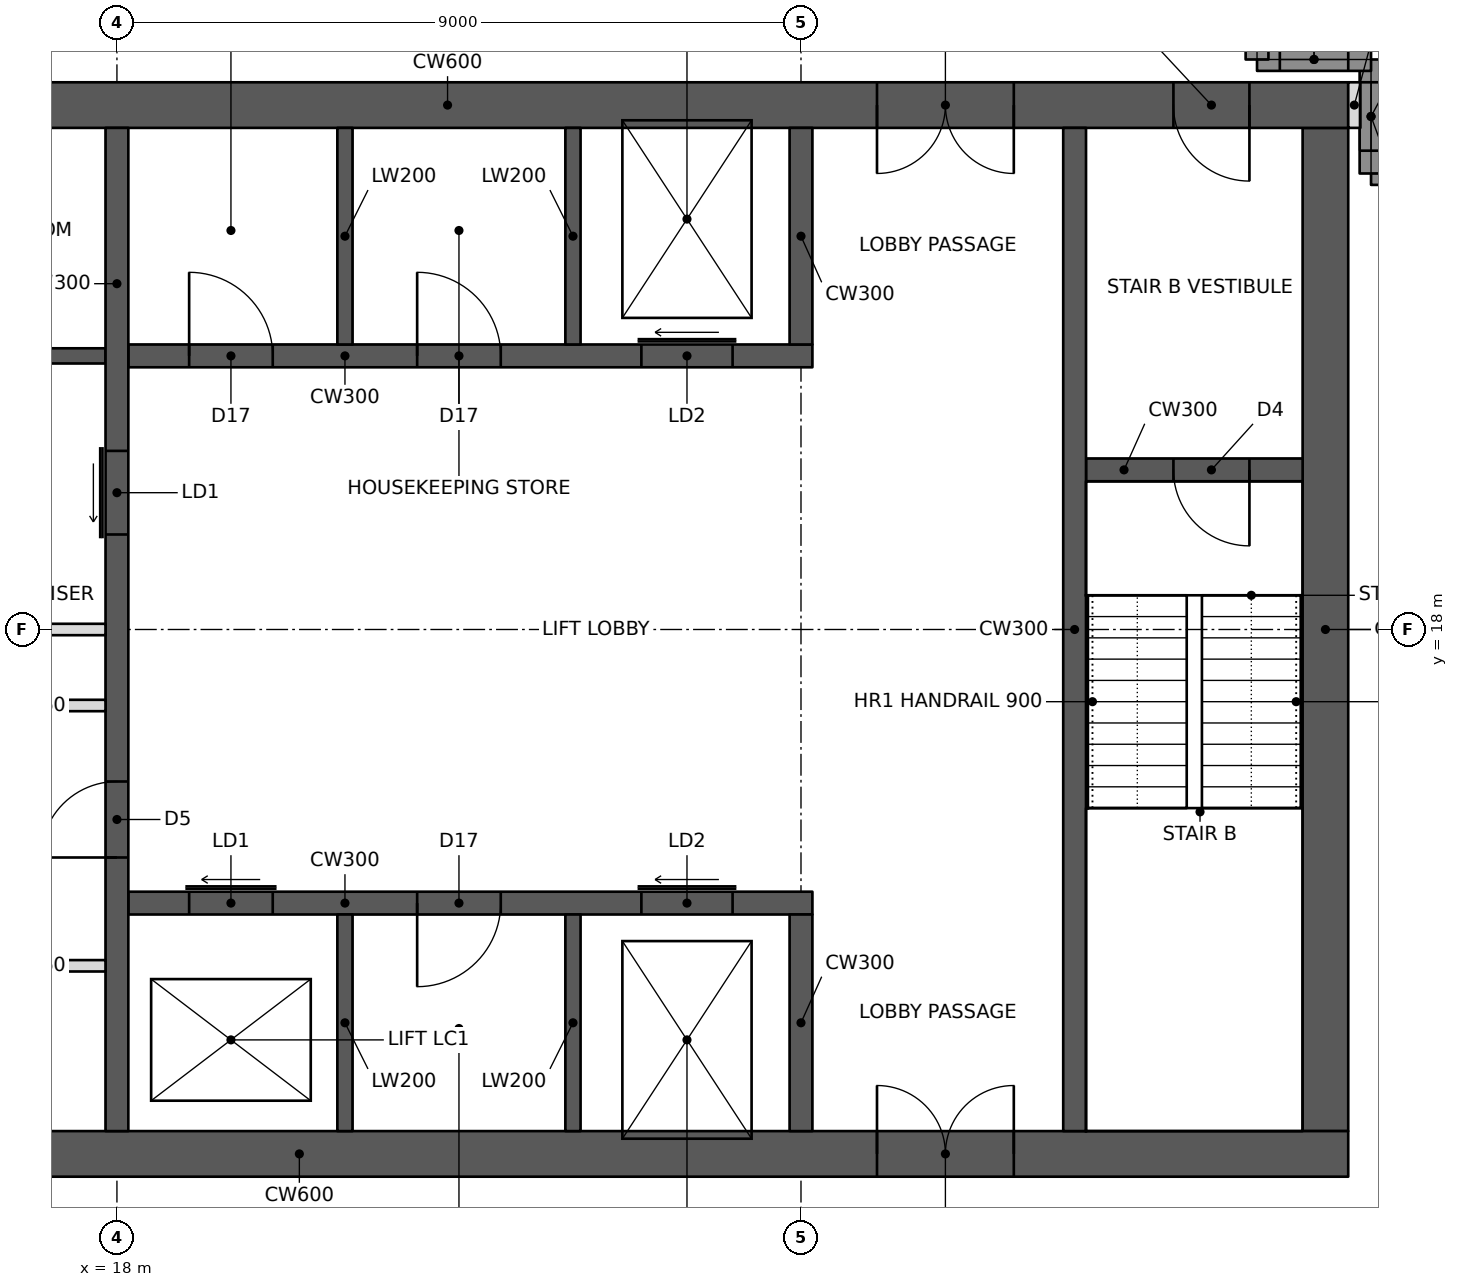
"""IFC4 building model, lengths in metres.
Left out: names, types, materials, properties, quantities, classifications, styles, units other than length and angle.
Written with IfcOpenShell. Run it as: python <this file> out.ifc"""

import sys

from ifc_helpers import new_model, si_unit, direction, frame, frame_2d, origin, place, context, subcontext, project, spatial, rectangle, extrude, element, fill, save


model = new_model("IFC4")
c1 = context("Model", 3, precision=1e-05, world=origin(), true_north=direction((0.0, 1.0)))
c2 = subcontext(c1, "Body", "Model", "MODEL_VIEW")
j1 = project(units=[si_unit("LENGTHUNIT", "METRE"), si_unit("PLANEANGLEUNIT", "RADIAN")], contexts=[c1])
p1 = place(None, origin())
s1 = spatial("IfcSite", under=j1, at=p1, CompositionType="ELEMENT")
p2 = place(p1, origin())
s2 = spatial("IfcBuilding", under=s1, at=p2, CompositionType="ELEMENT")
p3 = place(p2, frame((0.0, 0.0, 262.6)))
s3 = spatial("IfcBuildingStorey", under=s2, at=p3, CompositionType="ELEMENT", Elevation=262.6)
p4 = place(p3, frame((10.8, 11.1, 0.0), z_axis=(0.0, 0.0, 1.0), x_axis=(1.0, 0.0, 0.0)))
e1 = element("IfcWall", 1, at=p4, inside=s3, PredefinedType="SHEAR", context=c2, shape_type="SweptSolid", body=[
    extrude(rectangle(XDim=23.4, YDim=0.6, at=frame_2d((11.7, 0.0))), origin(), (0.0, 0.0, 1.0), 3.6),
])
p5 = place(p4, frame((1.0, 0.0, 0.0)))
e2 = element("IfcOpeningElement", 2, at=p5, cuts=e1, PredefinedType="OPENING", context=c2, shape_type="SweptSolid", body=[
    extrude(rectangle(XDim=1.0, YDim=2.1, at=frame_2d((0.5, 1.05))), frame((0.0, 0.31, 0.0), z_axis=(0.0, -1.0, 0.0), x_axis=(1.0, 0.0, 0.0)), (0.0, 0.0, 1.0), 0.62),
])
p6 = place(p4, frame((17.2, 0.0, 0.0)))
e3 = element("IfcOpeningElement", 3, at=p6, cuts=e1, PredefinedType="OPENING", context=c2, shape_type="SweptSolid", body=[
    extrude(rectangle(XDim=1.8, YDim=2.1, at=frame_2d((0.9, 1.05))), frame((0.0, 0.31, 0.0), z_axis=(0.0, -1.0, 0.0), x_axis=(1.0, 0.0, 0.0)), (0.0, 0.0, 1.0), 0.62),
])
p7 = place(p3, frame((10.8, 24.9, 0.0), z_axis=(0.0, 0.0, 1.0), x_axis=(1.0, 0.0, 0.0)))
e4 = element("IfcWall", 4, at=p7, inside=s3, PredefinedType="SHEAR", context=c2, shape_type="SweptSolid", body=[
    extrude(rectangle(XDim=23.4, YDim=0.6, at=frame_2d((11.7, 0.0))), origin(), (0.0, 0.0, 1.0), 3.6),
])
p8 = place(p7, frame((17.2, 0.0, 0.0)))
e5 = element("IfcOpeningElement", 5, at=p8, cuts=e4, PredefinedType="OPENING", context=c2, shape_type="SweptSolid", body=[
    extrude(rectangle(XDim=1.8, YDim=2.1, at=frame_2d((0.9, 1.05))), frame((0.0, 0.31, 0.0), z_axis=(0.0, -1.0, 0.0), x_axis=(1.0, 0.0, 0.0)), (0.0, 0.0, 1.0), 0.62),
])
p9 = place(p7, frame((21.1, 0.0, 0.0)))
e6 = element("IfcOpeningElement", 6, at=p9, cuts=e4, PredefinedType="OPENING", context=c2, shape_type="SweptSolid", body=[
    extrude(rectangle(XDim=1.0, YDim=2.1, at=frame_2d((0.5, 1.05))), frame((0.0, 0.31, 0.0), z_axis=(0.0, -1.0, 0.0), x_axis=(1.0, 0.0, 0.0)), (0.0, 0.0, 1.0), 0.62),
])
p10 = place(p7, frame((4.9, 0.0, 0.0)))
e7 = element("IfcOpeningElement", 7, at=p10, cuts=e4, PredefinedType="OPENING", context=c2, shape_type="SweptSolid", body=[
    extrude(rectangle(XDim=1.0, YDim=2.1, at=frame_2d((0.5, 1.05))), frame((0.0, 0.31, 0.0), z_axis=(0.0, -1.0, 0.0), x_axis=(1.0, 0.0, 0.0)), (0.0, 0.0, 1.0), 0.62),
])
p11 = place(p3, frame((33.9, 11.4, 0.0), z_axis=(0.0, 0.0, 1.0), x_axis=(0.0, 1.0, 0.0)))
e8 = element("IfcWall", 8, at=p11, inside=s3, PredefinedType="SHEAR", context=c2, shape_type="SweptSolid", body=[
    extrude(rectangle(XDim=13.2, YDim=0.6, at=frame_2d((6.6, 0.0))), origin(), (0.0, 0.0, 1.0), 3.6),
])
p12 = place(p3, frame((18.0, 11.4, 0.0), z_axis=(0.0, 0.0, 1.0), x_axis=(0.0, 1.0, 0.0)))
e9 = element("IfcWall", 9, at=p12, inside=s3, PredefinedType="SHEAR", context=c2, shape_type="SweptSolid", body=[
    extrude(rectangle(XDim=13.2, YDim=0.3, at=frame_2d((6.6, 0.0))), origin(), (0.0, 0.0, 1.0), 3.6),
])
p13 = place(p12, frame((3.6, 0.0, 0.0)))
e10 = element("IfcOpeningElement", 10, at=p13, cuts=e9, PredefinedType="OPENING", context=c2, shape_type="SweptSolid", body=[
    extrude(rectangle(XDim=1.0, YDim=2.1, at=frame_2d((0.5, 1.05))), frame((0.0, 0.16, 0.0), z_axis=(0.0, -1.0, 0.0), x_axis=(1.0, 0.0, 0.0)), (0.0, 0.0, 1.0), 0.32),
])
p14 = place(p12, frame((7.85, 0.0, 0.0)))
e11 = element("IfcOpeningElement", 11, at=p14, cuts=e9, PredefinedType="OPENING", context=c2, shape_type="SweptSolid", body=[
    extrude(rectangle(XDim=1.1, YDim=2.1, at=frame_2d((0.55, 1.05))), frame((0.0, 0.16, 0.0), z_axis=(0.0, -1.0, 0.0), x_axis=(1.0, 0.0, 0.0)), (0.0, 0.0, 1.0), 0.32),
])
p15 = place(p3, frame((14.55, 18.0, 0.0), z_axis=(0.0, 0.0, 1.0), x_axis=(1.0, 0.0, 0.0)))
e12 = element("IfcWall", 12, at=p15, inside=s3, PredefinedType="PARTITIONING", context=c2, shape_type="SweptSolid", body=[
    extrude(rectangle(XDim=3.3, YDim=0.15, at=frame_2d((1.65, 0.0))), origin(), (0.0, 0.0, 1.0), 3.4),
])
p16 = place(p3, frame((18.15, 14.4, 0.0), z_axis=(0.0, 0.0, 1.0), x_axis=(1.0, 0.0, 0.0)))
e13 = element("IfcWall", 13, at=p16, inside=s3, PredefinedType="SHEAR", context=c2, shape_type="SweptSolid", body=[
    extrude(rectangle(XDim=9.0, YDim=0.3, at=frame_2d((4.5, 0.0))), origin(), (0.0, 0.0, 1.0), 3.6),
])
p17 = place(p16, frame((0.8, 0.0, 0.0)))
e14 = element("IfcOpeningElement", 14, at=p17, cuts=e13, PredefinedType="OPENING", context=c2, shape_type="SweptSolid", body=[
    extrude(rectangle(XDim=1.1, YDim=2.1, at=frame_2d((0.55, 1.05))), frame((0.0, 0.16, 0.0), z_axis=(0.0, -1.0, 0.0), x_axis=(1.0, 0.0, 0.0)), (0.0, 0.0, 1.0), 0.32),
])
p18 = place(p16, frame((6.75, 0.0, 0.0)))
e15 = element("IfcOpeningElement", 15, at=p18, cuts=e13, PredefinedType="OPENING", context=c2, shape_type="SweptSolid", body=[
    extrude(rectangle(XDim=1.2, YDim=2.1, at=frame_2d((0.6, 1.05))), frame((0.0, 0.16, 0.0), z_axis=(0.0, -1.0, 0.0), x_axis=(1.0, 0.0, 0.0)), (0.0, 0.0, 1.0), 0.32),
])
p19 = place(p16, frame((3.8, 0.0, 0.0)))
e16 = element("IfcOpeningElement", 16, at=p19, cuts=e13, PredefinedType="OPENING", context=c2, shape_type="SweptSolid", body=[
    extrude(rectangle(XDim=1.1, YDim=2.1, at=frame_2d((0.55, 1.05))), frame((0.0, 0.16, 0.0), z_axis=(0.0, -1.0, 0.0), x_axis=(1.0, 0.0, 0.0)), (0.0, 0.0, 1.0), 0.32),
])
p20 = place(p3, frame((27.0, 11.4, 0.0), z_axis=(0.0, 0.0, 1.0), x_axis=(0.0, 1.0, 0.0)))
e17 = element("IfcWall", 17, at=p20, inside=s3, PredefinedType="SHEAR", context=c2, shape_type="SweptSolid", body=[
    extrude(rectangle(XDim=2.85, YDim=0.3, at=frame_2d((1.425, 0.0))), origin(), (0.0, 0.0, 1.0), 3.6),
])
for number, where, z_axis, x_axis in (
    (18, (21.0, 11.4, 0.0), (0.0, 0.0, 1.0), (0.0, 1.0, 0.0)),
    (19, (24.0, 11.4, 0.0), (0.0, 0.0, 1.0), (0.0, 1.0, 0.0)),
):
    element("IfcWall", number, at=place(p3, frame(where, z_axis=z_axis, x_axis=x_axis)), inside=s3, PredefinedType="SHEAR", context=c2, shape_type="SweptSolid", body=[
        extrude(rectangle(XDim=2.85, YDim=0.2, at=frame_2d((1.425, 0.0))), origin(), (0.0, 0.0, 1.0), 3.6),
    ])
p21 = place(p3, frame((18.15, 21.6, 0.0), z_axis=(0.0, 0.0, 1.0), x_axis=(1.0, 0.0, 0.0)))
e20 = element("IfcWall", 20, at=p21, inside=s3, PredefinedType="SHEAR", context=c2, shape_type="SweptSolid", body=[
    extrude(rectangle(XDim=9.0, YDim=0.3, at=frame_2d((4.5, 0.0))), origin(), (0.0, 0.0, 1.0), 3.6),
])
p22 = place(p21, frame((6.75, 0.0, 0.0)))
e21 = element("IfcOpeningElement", 21, at=p22, cuts=e20, PredefinedType="OPENING", context=c2, shape_type="SweptSolid", body=[
    extrude(rectangle(XDim=1.2, YDim=2.1, at=frame_2d((0.6, 1.05))), frame((0.0, 0.16, 0.0), z_axis=(0.0, -1.0, 0.0), x_axis=(1.0, 0.0, 0.0)), (0.0, 0.0, 1.0), 0.32),
])
p23 = place(p21, frame((0.8, 0.0, 0.0)))
e22 = element("IfcOpeningElement", 22, at=p23, cuts=e20, PredefinedType="OPENING", context=c2, shape_type="SweptSolid", body=[
    extrude(rectangle(XDim=1.1, YDim=2.1, at=frame_2d((0.55, 1.05))), frame((0.0, 0.16, 0.0), z_axis=(0.0, -1.0, 0.0), x_axis=(1.0, 0.0, 0.0)), (0.0, 0.0, 1.0), 0.32),
])
p24 = place(p21, frame((3.8, 0.0, 0.0)))
e23 = element("IfcOpeningElement", 23, at=p24, cuts=e20, PredefinedType="OPENING", context=c2, shape_type="SweptSolid", body=[
    extrude(rectangle(XDim=1.1, YDim=2.1, at=frame_2d((0.55, 1.05))), frame((0.0, 0.16, 0.0), z_axis=(0.0, -1.0, 0.0), x_axis=(1.0, 0.0, 0.0)), (0.0, 0.0, 1.0), 0.32),
])
p25 = place(p3, frame((27.0, 21.75, 0.0), z_axis=(0.0, 0.0, 1.0), x_axis=(0.0, 1.0, 0.0)))
e24 = element("IfcWall", 24, at=p25, inside=s3, PredefinedType="SHEAR", context=c2, shape_type="SweptSolid", body=[
    extrude(rectangle(XDim=2.85, YDim=0.3, at=frame_2d((1.425, 0.0))), origin(), (0.0, 0.0, 1.0), 3.6),
])
for number, where, z_axis, x_axis in (
    (25, (21.0, 21.75, 0.0), (0.0, 0.0, 1.0), (0.0, 1.0, 0.0)),
    (26, (24.0, 21.75, 0.0), (0.0, 0.0, 1.0), (0.0, 1.0, 0.0)),
):
    element("IfcWall", number, at=place(p3, frame(where, z_axis=z_axis, x_axis=x_axis)), inside=s3, PredefinedType="SHEAR", context=c2, shape_type="SweptSolid", body=[
        extrude(rectangle(XDim=2.85, YDim=0.2, at=frame_2d((1.425, 0.0))), origin(), (0.0, 0.0, 1.0), 3.6),
    ])
p26 = place(p3, frame((30.6, 11.4, 0.0), z_axis=(0.0, 0.0, 1.0), x_axis=(0.0, 1.0, 0.0)))
e27 = element("IfcWall", 27, at=p26, inside=s3, PredefinedType="SHEAR", context=c2, shape_type="SweptSolid", body=[
    extrude(rectangle(XDim=13.2, YDim=0.3, at=frame_2d((6.6, 0.0))), origin(), (0.0, 0.0, 1.0), 3.6),
])
p27 = place(p3, frame((30.75, 20.1, 0.0), z_axis=(0.0, 0.0, 1.0), x_axis=(1.0, 0.0, 0.0)))
e28 = element("IfcWall", 28, at=p27, inside=s3, PredefinedType="SHEAR", context=c2, shape_type="SweptSolid", body=[
    extrude(rectangle(XDim=2.85, YDim=0.3, at=frame_2d((1.425, 0.0))), origin(), (0.0, 0.0, 1.0), 3.6),
])
p28 = place(p27, frame((1.15, 0.0, 0.0)))
e29 = element("IfcOpeningElement", 29, at=p28, cuts=e28, PredefinedType="OPENING", context=c2, shape_type="SweptSolid", body=[
    extrude(rectangle(XDim=1.0, YDim=2.1, at=frame_2d((0.5, 1.05))), frame((0.0, 0.16, 0.0), z_axis=(0.0, -1.0, 0.0), x_axis=(1.0, 0.0, 0.0)), (0.0, 0.0, 1.0), 0.32),
])
p29 = place(p3, frame((14.55, 21.6, 0.0), z_axis=(0.0, 0.0, 1.0), x_axis=(1.0, 0.0, 0.0)))
e30 = element("IfcWall", 30, at=p29, inside=s3, PredefinedType="SHEAR", context=c2, shape_type="SweptSolid", body=[
    extrude(rectangle(XDim=3.3, YDim=0.2, at=frame_2d((1.65, 0.0))), origin(), (0.0, 0.0, 1.0), 3.6),
])
p30 = place(p3, frame((36.0, 24.0, 0.0), z_axis=(0.0, 0.0, 1.0), x_axis=(-1.0, 0.0, 0.0)))
e31 = element("IfcWall", 31, at=p30, inside=s3, PredefinedType="SOLIDWALL", context=c2, shape_type="SweptSolid", body=[
    extrude(rectangle(XDim=1.5, YDim=0.3, at=frame_2d((0.75, 0.0))), origin(), (0.0, 0.0, 1.0), 2.62),
])
p31 = place(p3, frame((34.5, 24.0, 0.0), z_axis=(0.0, 0.0, 1.0), x_axis=(0.0, 1.0, 0.0)))
e32 = element("IfcWall", 32, at=p31, inside=s3, PredefinedType="SOLIDWALL", context=c2, shape_type="SweptSolid", body=[
    extrude(rectangle(XDim=1.5, YDim=0.3, at=frame_2d((0.75, 0.0))), origin(), (0.0, 0.0, 1.0), 3.4),
])
p32 = place(p31, frame((0.3, 0.0, 0.6)))
e33 = element("IfcOpeningElement", 33, at=p32, cuts=e32, PredefinedType="OPENING", context=c2, shape_type="SweptSolid", body=[
    extrude(rectangle(XDim=0.9, YDim=2.2, at=frame_2d((0.45, 1.1))), frame((0.0, 0.16, 0.0), z_axis=(0.0, -1.0, 0.0), x_axis=(1.0, 0.0, 0.0)), (0.0, 0.0, 1.0), 0.32),
])
p33 = place(p3, frame((34.5, 25.5, 0.0), z_axis=(0.0, 0.0, 1.0), x_axis=(-1.0, 0.0, 0.0)))
e34 = element("IfcWall", 34, at=p33, inside=s3, PredefinedType="SOLIDWALL", context=c2, shape_type="SweptSolid", body=[
    extrude(rectangle(XDim=1.5, YDim=0.3, at=frame_2d((0.75, 0.0))), origin(), (0.0, 0.0, 1.0), 3.4),
])
p34 = place(p33, frame((0.3, 0.0, 0.6)))
e35 = element("IfcOpeningElement", 35, at=p34, cuts=e34, PredefinedType="OPENING", context=c2, shape_type="SweptSolid", body=[
    extrude(rectangle(XDim=0.9, YDim=2.2, at=frame_2d((0.45, 1.1))), frame((0.0, 0.16, 0.0), z_axis=(0.0, -1.0, 0.0), x_axis=(1.0, 0.0, 0.0)), (0.0, 0.0, 1.0), 0.32),
])
p35 = place(p3, frame((33.0, 25.5, 0.0), z_axis=(0.0, 0.0, 1.0), x_axis=(0.0, 1.0, 0.0)))
e36 = element("IfcWall", 36, at=p35, inside=s3, PredefinedType="SOLIDWALL", context=c2, shape_type="SweptSolid", body=[
    extrude(rectangle(XDim=1.5, YDim=0.3, at=frame_2d((0.75, 0.0))), origin(), (0.0, 0.0, 1.0), 2.62),
])
p36 = place(p3, frame((34.2, 24.9, 0.0), z_axis=(0.0, 0.0, 1.0), x_axis=(1.0, 0.0, 0.0)))
e37 = element("IfcWall", 37, at=p36, inside=s3, PredefinedType="PARTITIONING", context=c2, shape_type="SweptSolid", body=[
    extrude(rectangle(XDim=0.16, YDim=0.6, at=frame_2d((0.08, 0.0))), origin(), (0.0, 0.0, 1.0), 3.4),
])
p37 = place(p3, frame((14.55, 17.0, 0.0), z_axis=(0.0, 0.0, 1.0), x_axis=(1.0, 0.0, 0.0)))
e38 = element("IfcWall", 38, at=p37, inside=s3, PredefinedType="PARTITIONING", context=c2, shape_type="SweptSolid", body=[
    extrude(rectangle(XDim=3.3, YDim=0.15, at=frame_2d((1.65, 0.0))), origin(), (0.0, 0.0, 1.0), 3.4),
])
p38 = place(p37, frame((0.3, 0.0, 0.0)))
e39 = element("IfcOpeningElement", 39, at=p38, cuts=e38, PredefinedType="OPENING", context=c2, shape_type="SweptSolid", body=[
    extrude(rectangle(XDim=1.0, YDim=2.1, at=frame_2d((0.5, 1.05))), frame((0.0, 0.085, 0.0), z_axis=(0.0, -1.0, 0.0), x_axis=(1.0, 0.0, 0.0)), (0.0, 0.0, 1.0), 0.17),
])
p39 = place(p3, frame((14.55, 13.575, 0.0), z_axis=(0.0, 0.0, 1.0), x_axis=(1.0, 0.0, 0.0)))
e40 = element("IfcWall", 40, at=p39, inside=s3, PredefinedType="PARTITIONING", context=c2, shape_type="SweptSolid", body=[
    extrude(rectangle(XDim=3.3, YDim=0.15, at=frame_2d((1.65, 0.0))), origin(), (0.0, 0.0, 1.0), 3.4),
])
p40 = place(p39, frame((0.3, 0.0, 0.0)))
e41 = element("IfcOpeningElement", 41, at=p40, cuts=e40, PredefinedType="OPENING", context=c2, shape_type="SweptSolid", body=[
    extrude(rectangle(XDim=1.0, YDim=2.1, at=frame_2d((0.5, 1.05))), frame((0.0, 0.085, 0.0), z_axis=(0.0, -1.0, 0.0), x_axis=(1.0, 0.0, 0.0)), (0.0, 0.0, 1.0), 0.17),
])
p41 = place(p32, origin())
e42 = element("IfcWindow", 42, at=p41, inside=s3, PartitioningType="SINGLE_PANEL", PredefinedType="WINDOW", context=c2, shape_type="SweptSolid", body=[
    extrude(rectangle(XDim=0.9, YDim=2.2, at=frame_2d((0.45, 1.1))), frame((0.0, 0.03, 0.0), z_axis=(0.0, -1.0, 0.0), x_axis=(1.0, 0.0, 0.0)), (0.0, 0.0, 1.0), 0.06),
])
fill(e33, e42)
p42 = place(p34, origin())
e43 = element("IfcWindow", 43, at=p42, inside=s3, PartitioningType="SINGLE_PANEL", PredefinedType="WINDOW", context=c2, shape_type="SweptSolid", body=[
    extrude(rectangle(XDim=0.9, YDim=2.2, at=frame_2d((0.45, 1.1))), frame((0.0, 0.03, 0.0), z_axis=(0.0, -1.0, 0.0), x_axis=(1.0, 0.0, 0.0)), (0.0, 0.0, 1.0), 0.06),
])
fill(e35, e43)
p43 = place(p6, origin())
e44 = element("IfcDoor", 44, at=p43, inside=s3, OperationType="DOUBLE_DOOR_SINGLE_SWING", PredefinedType="DOOR", context=c2, shape_type="SweptSolid", body=[
    extrude(rectangle(XDim=1.8, YDim=2.1, at=frame_2d((0.9, 1.05))), frame((0.0, 0.025, 0.0), z_axis=(0.0, -1.0, 0.0), x_axis=(1.0, 0.0, 0.0)), (0.0, 0.0, 1.0), 0.05),
])
fill(e3, e44)
p44 = place(p8, frame((1.8, 0.0, 0.0), z_axis=(0.0, 0.0, 1.0), x_axis=(-1.0, 0.0, 0.0)))
e45 = element("IfcDoor", 45, at=p44, inside=s3, OperationType="DOUBLE_DOOR_SINGLE_SWING", PredefinedType="DOOR", context=c2, shape_type="SweptSolid", body=[
    extrude(rectangle(XDim=1.8, YDim=2.1, at=frame_2d((0.9, 1.05))), frame((0.0, 0.025, 0.0), z_axis=(0.0, -1.0, 0.0), x_axis=(1.0, 0.0, 0.0)), (0.0, 0.0, 1.0), 0.05),
])
fill(e5, e45)
p45 = place(p9, frame((1.0, 0.0, 0.0), z_axis=(0.0, 0.0, 1.0), x_axis=(-1.0, 0.0, 0.0)))
e46 = element("IfcDoor", 46, at=p45, inside=s3, OperationType="SINGLE_SWING_LEFT", PredefinedType="DOOR", context=c2, shape_type="SweptSolid", body=[
    extrude(rectangle(XDim=1.0, YDim=2.1, at=frame_2d((0.5, 1.05))), frame((0.0, 0.025, 0.0), z_axis=(0.0, -1.0, 0.0), x_axis=(1.0, 0.0, 0.0)), (0.0, 0.0, 1.0), 0.05),
])
fill(e6, e46)
p46 = place(p28, frame((1.0, 0.0, 0.0), z_axis=(0.0, 0.0, 1.0), x_axis=(-1.0, 0.0, 0.0)))
e47 = element("IfcDoor", 47, at=p46, inside=s3, OperationType="SINGLE_SWING_LEFT", PredefinedType="DOOR", context=c2, shape_type="SweptSolid", body=[
    extrude(rectangle(XDim=1.0, YDim=2.1, at=frame_2d((0.5, 1.05))), frame((0.0, 0.025, 0.0), z_axis=(0.0, -1.0, 0.0), x_axis=(1.0, 0.0, 0.0)), (0.0, 0.0, 1.0), 0.05),
])
fill(e29, e47)
p47 = place(p13, origin())
e48 = element("IfcDoor", 48, at=p47, inside=s3, OperationType="SINGLE_SWING_LEFT", PredefinedType="DOOR", context=c2, shape_type="SweptSolid", body=[
    extrude(rectangle(XDim=1.0, YDim=2.1, at=frame_2d((0.5, 1.05))), frame((0.0, 0.025, 0.0), z_axis=(0.0, -1.0, 0.0), x_axis=(1.0, 0.0, 0.0)), (0.0, 0.0, 1.0), 0.05),
])
fill(e10, e48)
p48 = place(p17, origin())
e49 = element("IfcDoor", 49, at=p48, inside=s3, OperationType="SLIDING_TO_LEFT", PredefinedType="DOOR", context=c2, shape_type="SweptSolid", body=[
    extrude(rectangle(XDim=1.1, YDim=2.1, at=frame_2d((0.55, 1.05))), frame((0.0, 0.025, 0.0), z_axis=(0.0, -1.0, 0.0), x_axis=(1.0, 0.0, 0.0)), (0.0, 0.0, 1.0), 0.05),
])
fill(e14, e49)
p49 = place(p14, origin())
e50 = element("IfcDoor", 50, at=p49, inside=s3, OperationType="SLIDING_TO_LEFT", PredefinedType="DOOR", context=c2, shape_type="SweptSolid", body=[
    extrude(rectangle(XDim=1.1, YDim=2.1, at=frame_2d((0.55, 1.05))), frame((0.0, 0.025, 0.0), z_axis=(0.0, -1.0, 0.0), x_axis=(1.0, 0.0, 0.0)), (0.0, 0.0, 1.0), 0.05),
])
fill(e11, e50)
p50 = place(p18, origin())
e51 = element("IfcDoor", 51, at=p50, inside=s3, OperationType="SLIDING_TO_LEFT", PredefinedType="DOOR", context=c2, shape_type="SweptSolid", body=[
    extrude(rectangle(XDim=1.2, YDim=2.1, at=frame_2d((0.6, 1.05))), frame((0.0, 0.025, 0.0), z_axis=(0.0, -1.0, 0.0), x_axis=(1.0, 0.0, 0.0)), (0.0, 0.0, 1.0), 0.05),
])
fill(e15, e51)
p51 = place(p22, origin())
e52 = element("IfcDoor", 52, at=p51, inside=s3, OperationType="SLIDING_TO_LEFT", PredefinedType="DOOR", context=c2, shape_type="SweptSolid", body=[
    extrude(rectangle(XDim=1.2, YDim=2.1, at=frame_2d((0.6, 1.05))), frame((0.0, 0.025, 0.0), z_axis=(0.0, -1.0, 0.0), x_axis=(1.0, 0.0, 0.0)), (0.0, 0.0, 1.0), 0.05),
])
fill(e21, e52)
p52 = place(p23, origin())
e53 = element("IfcDoor", 53, at=p52, inside=s3, OperationType="SINGLE_SWING_LEFT", PredefinedType="DOOR", context=c2, shape_type="SweptSolid", body=[
    extrude(rectangle(XDim=1.1, YDim=2.1, at=frame_2d((0.55, 1.05))), frame((0.0, 0.025, 0.0), z_axis=(0.0, -1.0, 0.0), x_axis=(1.0, 0.0, 0.0)), (0.0, 0.0, 1.0), 0.05),
])
fill(e22, e53)
p53 = place(p24, origin())
e54 = element("IfcDoor", 54, at=p53, inside=s3, OperationType="SINGLE_SWING_LEFT", PredefinedType="DOOR", context=c2, shape_type="SweptSolid", body=[
    extrude(rectangle(XDim=1.1, YDim=2.1, at=frame_2d((0.55, 1.05))), frame((0.0, 0.025, 0.0), z_axis=(0.0, -1.0, 0.0), x_axis=(1.0, 0.0, 0.0)), (0.0, 0.0, 1.0), 0.05),
])
fill(e23, e54)
p54 = place(p19, frame((1.1, 0.0, 0.0), z_axis=(0.0, 0.0, 1.0), x_axis=(-1.0, 0.0, 0.0)))
e55 = element("IfcDoor", 55, at=p54, inside=s3, OperationType="SINGLE_SWING_RIGHT", PredefinedType="DOOR", context=c2, shape_type="SweptSolid", body=[
    extrude(rectangle(XDim=1.1, YDim=2.1, at=frame_2d((0.55, 1.05))), frame((0.0, 0.025, 0.0), z_axis=(0.0, -1.0, 0.0), x_axis=(1.0, 0.0, 0.0)), (0.0, 0.0, 1.0), 0.05),
])
fill(e16, e55)
save(model, sys.argv[1])
